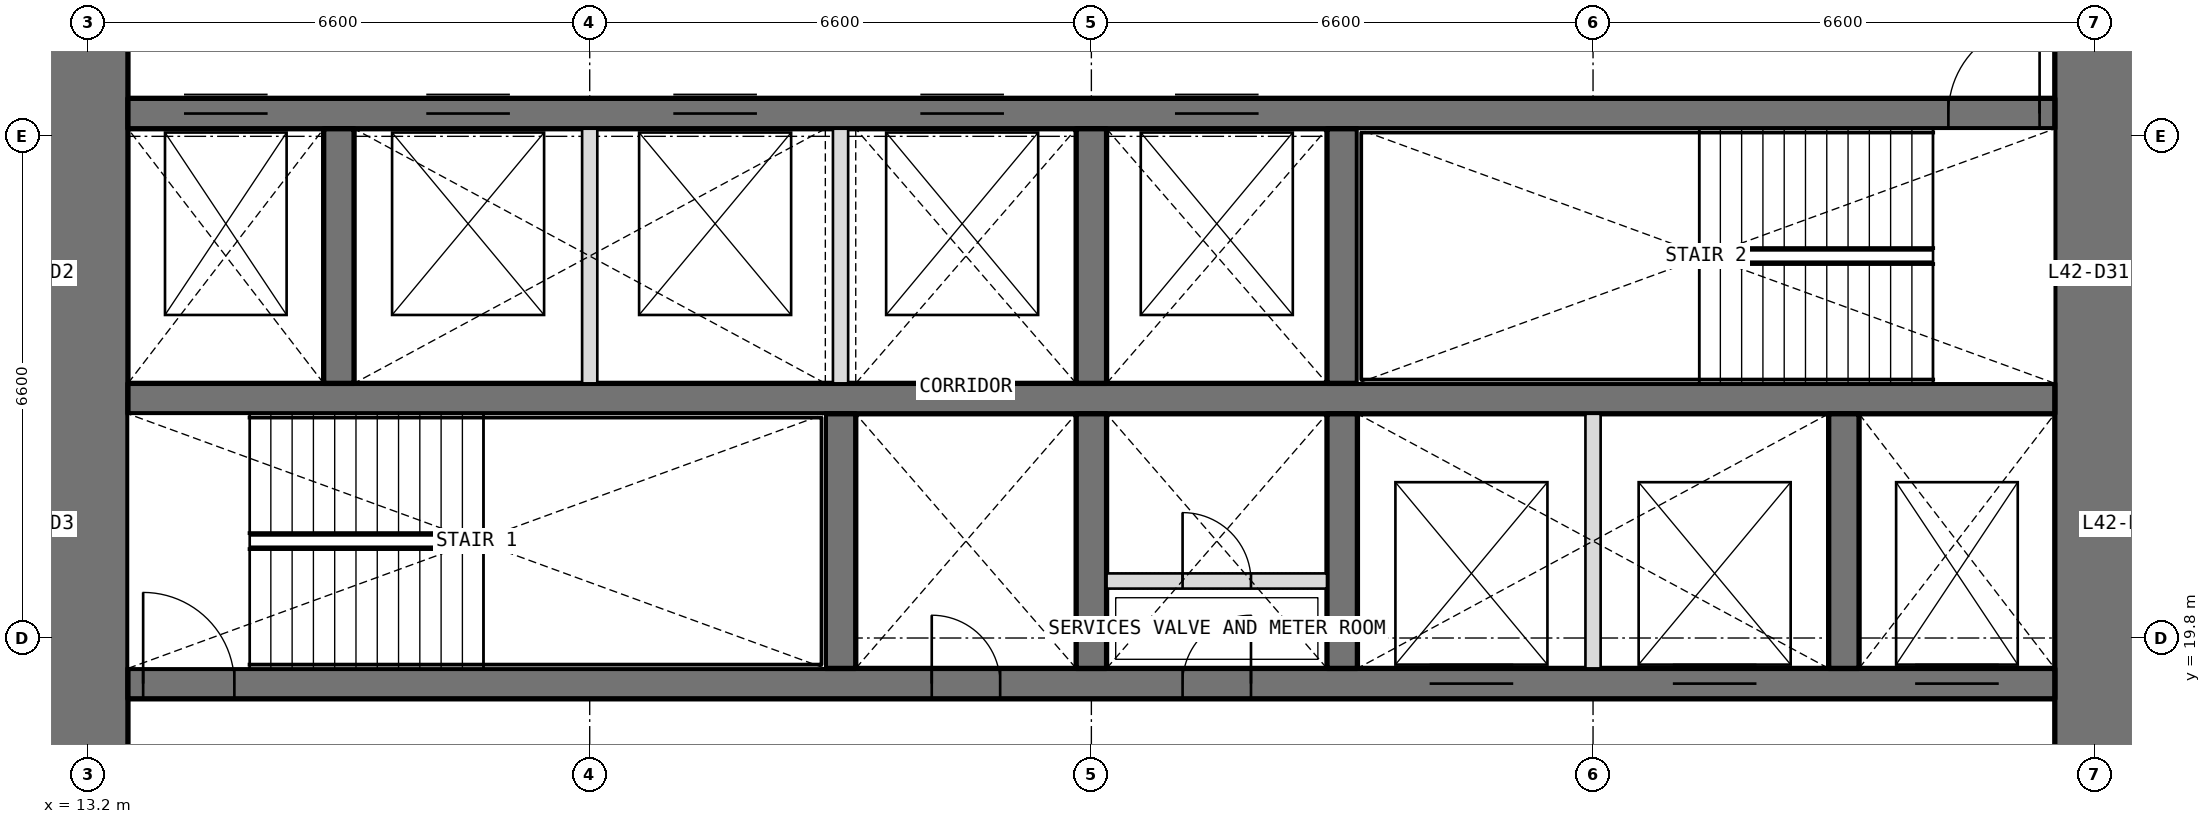
"""IFC4 building model, lengths in metres.
Left out: names, types, materials, properties, quantities, classifications, styles, units other than length and angle.
Written with IfcOpenShell. Run it as: python <this file> out.ifc"""

import sys

from ifc_helpers import new_model, si_unit, direction, frame, frame_2d, origin, place, context, subcontext, project, spatial, rectangle, extrude, element, fill, save


model = new_model("IFC4")
c1 = context("Model", 3, precision=1e-05, world=origin(), true_north=direction((0.0, 1.0)))
c2 = subcontext(c1, "Body", "Model", "MODEL_VIEW")
j1 = project(units=[si_unit("LENGTHUNIT", "METRE"), si_unit("PLANEANGLEUNIT", "RADIAN")], contexts=[c1])
p1 = place(None, origin())
s1 = spatial("IfcSite", under=j1, at=p1, CompositionType="ELEMENT")
p2 = place(p1, origin())
s2 = spatial("IfcBuilding", under=s1, at=p2, CompositionType="ELEMENT")
p3 = place(p2, frame((0.0, 0.0, 185.1)))
s3 = spatial("IfcBuildingStorey", under=s2, at=p3, CompositionType="ELEMENT", Elevation=185.1)
p4 = place(p3, frame((39.6, 13.725, 0.0), z_axis=(0.0, 0.0, 1.0), x_axis=(0.0, 1.0, 0.0)))
e1 = element("IfcWall", 1, at=p4, inside=s3, PredefinedType="SHEAR", context=c2, shape_type="SweptSolid", body=[
    extrude(rectangle(XDim=18.75, YDim=1.05, at=frame_2d((9.375, 0.0))), origin(), (0.0, 0.0, 1.0), 4.2),
])
p5 = place(p4, frame((3.025, 0.0, 0.0)))
e2 = element("IfcOpeningElement", 2, at=p5, cuts=e1, PredefinedType="OPENING", context=c2, shape_type="SweptSolid", body=[
    extrude(rectangle(XDim=1.6, YDim=2.1, at=frame_2d((0.8, 1.05))), frame((0.0, 0.535, 0.0), z_axis=(0.0, -1.0, 0.0), x_axis=(1.0, 0.0, 0.0)), (0.0, 0.0, 1.0), 1.07),
])
p6 = place(p4, frame((13.825, 0.0, 0.0)))
e3 = element("IfcOpeningElement", 3, at=p6, cuts=e1, PredefinedType="OPENING", context=c2, shape_type="SweptSolid", body=[
    extrude(rectangle(XDim=1.6, YDim=2.1, at=frame_2d((0.8, 1.05))), frame((0.0, 0.535, 0.0), z_axis=(0.0, -1.0, 0.0), x_axis=(1.0, 0.0, 0.0)), (0.0, 0.0, 1.0), 1.07),
])
p7 = place(p3, frame((13.2, 32.475, 0.0), z_axis=(0.0, 0.0, 1.0), x_axis=(0.0, -1.0, 0.0)))
e4 = element("IfcWall", 4, at=p7, inside=s3, PredefinedType="SHEAR", context=c2, shape_type="SweptSolid", body=[
    extrude(rectangle(XDim=18.75, YDim=1.05, at=frame_2d((9.375, 0.0))), origin(), (0.0, 0.0, 1.0), 4.2),
])
p8 = place(p7, frame((14.125, 0.0, 0.0)))
e5 = element("IfcOpeningElement", 5, at=p8, cuts=e4, PredefinedType="OPENING", context=c2, shape_type="SweptSolid", body=[
    extrude(rectangle(XDim=1.6, YDim=2.1, at=frame_2d((0.8, 1.05))), frame((0.0, 0.535, 0.0), z_axis=(0.0, -1.0, 0.0), x_axis=(1.0, 0.0, 0.0)), (0.0, 0.0, 1.0), 1.07),
])
p9 = place(p7, frame((3.325, 0.0, 0.0)))
e6 = element("IfcOpeningElement", 6, at=p9, cuts=e4, PredefinedType="OPENING", context=c2, shape_type="SweptSolid", body=[
    extrude(rectangle(XDim=1.6, YDim=2.1, at=frame_2d((0.8, 1.05))), frame((0.0, 0.535, 0.0), z_axis=(0.0, -1.0, 0.0), x_axis=(1.0, 0.0, 0.0)), (0.0, 0.0, 1.0), 1.07),
])
p10 = place(p3, frame((13.725, 19.2, 0.0), z_axis=(0.0, 0.0, 1.0), x_axis=(1.0, 0.0, 0.0)))
e7 = element("IfcWall", 7, at=p10, inside=s3, PredefinedType="SHEAR", context=c2, shape_type="SweptSolid", body=[
    extrude(rectangle(XDim=25.35, YDim=0.4, at=frame_2d((12.675, 0.0))), origin(), (0.0, 0.0, 1.0), 4.2),
])
p11 = place(p10, frame((10.575, 0.0, 0.0)))
e8 = element("IfcOpeningElement", 8, at=p11, cuts=e7, PredefinedType="OPENING", context=c2, shape_type="SweptSolid", body=[
    extrude(rectangle(XDim=0.9, YDim=2.1, at=frame_2d((0.45, 1.05))), frame((0.0, 0.21, 0.0), z_axis=(0.0, -1.0, 0.0), x_axis=(1.0, 0.0, 0.0)), (0.0, 0.0, 1.0), 0.42),
])
p12 = place(p10, frame((13.875, 0.0, 0.0)))
e9 = element("IfcOpeningElement", 9, at=p12, cuts=e7, PredefinedType="OPENING", context=c2, shape_type="SweptSolid", body=[
    extrude(rectangle(XDim=0.9, YDim=2.1, at=frame_2d((0.45, 1.05))), frame((0.0, 0.21, 0.0), z_axis=(0.0, -1.0, 0.0), x_axis=(1.0, 0.0, 0.0)), (0.0, 0.0, 1.0), 0.42),
])
p13 = place(p10, frame((0.2, 0.0, 0.0)))
e10 = element("IfcOpeningElement", 10, at=p13, cuts=e7, PredefinedType="OPENING", context=c2, shape_type="SweptSolid", body=[
    extrude(rectangle(XDim=1.2, YDim=2.1, at=frame_2d((0.6, 1.05))), frame((0.0, 0.21, 0.0), z_axis=(0.0, -1.0, 0.0), x_axis=(1.0, 0.0, 0.0)), (0.0, 0.0, 1.0), 0.42),
])
p14 = place(p10, frame((23.512, 0.0, 0.0)))
e11 = element("IfcOpeningElement", 11, at=p14, cuts=e7, PredefinedType="OPENING", context=c2, shape_type="SweptSolid", body=[
    extrude(rectangle(XDim=1.1, YDim=2.1, at=frame_2d((0.55, 1.05))), frame((0.0, 0.21, 0.0), z_axis=(0.0, -1.0, 0.0), x_axis=(1.0, 0.0, 0.0)), (0.0, 0.0, 1.0), 0.42),
])
p15 = place(p10, frame((17.125, 0.0, 0.0)))
e12 = element("IfcOpeningElement", 12, at=p15, cuts=e7, PredefinedType="OPENING", context=c2, shape_type="SweptSolid", body=[
    extrude(rectangle(XDim=1.1, YDim=2.1, at=frame_2d((0.55, 1.05))), frame((0.0, 0.21, 0.0), z_axis=(0.0, -1.0, 0.0), x_axis=(1.0, 0.0, 0.0)), (0.0, 0.0, 1.0), 0.42),
])
p16 = place(p10, frame((20.325, 0.0, 0.0)))
e13 = element("IfcOpeningElement", 13, at=p16, cuts=e7, PredefinedType="OPENING", context=c2, shape_type="SweptSolid", body=[
    extrude(rectangle(XDim=1.1, YDim=2.1, at=frame_2d((0.55, 1.05))), frame((0.0, 0.21, 0.0), z_axis=(0.0, -1.0, 0.0), x_axis=(1.0, 0.0, 0.0)), (0.0, 0.0, 1.0), 0.42),
])
p17 = place(p3, frame((13.725, 22.95, 0.0), z_axis=(0.0, 0.0, 1.0), x_axis=(1.0, 0.0, 0.0)))
e14 = element("IfcWall", 14, at=p17, inside=s3, PredefinedType="SHEAR", context=c2, shape_type="SweptSolid", body=[
    extrude(rectangle(XDim=25.35, YDim=0.4, at=frame_2d((12.675, 0.0))), origin(), (0.0, 0.0, 1.0), 4.2),
])
p18 = place(p3, frame((13.725, 26.7, 0.0), z_axis=(0.0, 0.0, 1.0), x_axis=(1.0, 0.0, 0.0)))
e15 = element("IfcWall", 15, at=p18, inside=s3, PredefinedType="SHEAR", context=c2, shape_type="SweptSolid", body=[
    extrude(rectangle(XDim=25.35, YDim=0.4, at=frame_2d((12.675, 0.0))), origin(), (0.0, 0.0, 1.0), 4.2),
])
p19 = place(p18, frame((23.95, 0.0, 0.0)))
e16 = element("IfcOpeningElement", 16, at=p19, cuts=e15, PredefinedType="OPENING", context=c2, shape_type="SweptSolid", body=[
    extrude(rectangle(XDim=1.2, YDim=2.1, at=frame_2d((0.6, 1.05))), frame((0.0, 0.21, 0.0), z_axis=(0.0, -1.0, 0.0), x_axis=(1.0, 0.0, 0.0)), (0.0, 0.0, 1.0), 0.42),
])
p20 = place(p18, frame((0.738, 0.0, 0.0)))
e17 = element("IfcOpeningElement", 17, at=p20, cuts=e15, PredefinedType="OPENING", context=c2, shape_type="SweptSolid", body=[
    extrude(rectangle(XDim=1.1, YDim=2.1, at=frame_2d((0.55, 1.05))), frame((0.0, 0.21, 0.0), z_axis=(0.0, -1.0, 0.0), x_axis=(1.0, 0.0, 0.0)), (0.0, 0.0, 1.0), 0.42),
])
p21 = place(p18, frame((3.925, 0.0, 0.0)))
e18 = element("IfcOpeningElement", 18, at=p21, cuts=e15, PredefinedType="OPENING", context=c2, shape_type="SweptSolid", body=[
    extrude(rectangle(XDim=1.1, YDim=2.1, at=frame_2d((0.55, 1.05))), frame((0.0, 0.21, 0.0), z_axis=(0.0, -1.0, 0.0), x_axis=(1.0, 0.0, 0.0)), (0.0, 0.0, 1.0), 0.42),
])
p22 = place(p18, frame((7.175, 0.0, 0.0)))
e19 = element("IfcOpeningElement", 19, at=p22, cuts=e15, PredefinedType="OPENING", context=c2, shape_type="SweptSolid", body=[
    extrude(rectangle(XDim=1.1, YDim=2.1, at=frame_2d((0.55, 1.05))), frame((0.0, 0.21, 0.0), z_axis=(0.0, -1.0, 0.0), x_axis=(1.0, 0.0, 0.0)), (0.0, 0.0, 1.0), 0.42),
])
p23 = place(p18, frame((10.425, 0.0, 0.0)))
e20 = element("IfcOpeningElement", 20, at=p23, cuts=e15, PredefinedType="OPENING", context=c2, shape_type="SweptSolid", body=[
    extrude(rectangle(XDim=1.1, YDim=2.1, at=frame_2d((0.55, 1.05))), frame((0.0, 0.21, 0.0), z_axis=(0.0, -1.0, 0.0), x_axis=(1.0, 0.0, 0.0)), (0.0, 0.0, 1.0), 0.42),
])
p24 = place(p18, frame((13.775, 0.0, 0.0)))
e21 = element("IfcOpeningElement", 21, at=p24, cuts=e15, PredefinedType="OPENING", context=c2, shape_type="SweptSolid", body=[
    extrude(rectangle(XDim=1.1, YDim=2.1, at=frame_2d((0.55, 1.05))), frame((0.0, 0.21, 0.0), z_axis=(0.0, -1.0, 0.0), x_axis=(1.0, 0.0, 0.0)), (0.0, 0.0, 1.0), 0.42),
])
for number, where, z_axis, x_axis in (
    (22, (23.1, 19.4, 0.0), (0.0, 0.0, 1.0), (0.0, 1.0, 0.0)),
    (23, (26.4, 19.4, 0.0), (0.0, 0.0, 1.0), (0.0, 1.0, 0.0)),
    (24, (29.7, 19.4, 0.0), (0.0, 0.0, 1.0), (0.0, 1.0, 0.0)),
    (25, (36.3, 19.4, 0.0), (0.0, 0.0, 1.0), (0.0, 1.0, 0.0)),
    (26, (16.5, 23.15, 0.0), (0.0, 0.0, 1.0), (0.0, 1.0, 0.0)),
    (27, (26.4, 23.15, 0.0), (0.0, 0.0, 1.0), (0.0, 1.0, 0.0)),
    (28, (29.7, 23.15, 0.0), (0.0, 0.0, 1.0), (0.0, 1.0, 0.0)),
):
    element("IfcWall", number, at=place(p3, frame(where, z_axis=z_axis, x_axis=x_axis)), inside=s3, PredefinedType="SHEAR", context=c2, shape_type="SweptSolid", body=[
        extrude(rectangle(XDim=3.35, YDim=0.4, at=frame_2d((1.675, 0.0))), origin(), (0.0, 0.0, 1.0), 4.2),
    ])
for number, where, z_axis, x_axis in (
    (29, (33.0, 19.4, 0.0), (0.0, 0.0, 1.0), (0.0, 1.0, 0.0)),
    (30, (19.8, 23.15, 0.0), (0.0, 0.0, 1.0), (0.0, 1.0, 0.0)),
    (31, (23.1, 23.15, 0.0), (0.0, 0.0, 1.0), (0.0, 1.0, 0.0)),
):
    element("IfcWall", number, at=place(p3, frame(where, z_axis=z_axis, x_axis=x_axis)), inside=s3, PredefinedType="PARTITIONING", context=c2, shape_type="SweptSolid", body=[
        extrude(rectangle(XDim=3.35, YDim=0.2, at=frame_2d((1.675, 0.0))), origin(), (0.0, 0.0, 1.0), 4.2),
    ])
p25 = place(p3, frame((26.6, 20.55, 0.0), z_axis=(0.0, 0.0, 1.0), x_axis=(1.0, 0.0, 0.0)))
e32 = element("IfcWall", 32, at=p25, inside=s3, PredefinedType="PARTITIONING", context=c2, shape_type="SweptSolid", body=[
    extrude(rectangle(XDim=2.9, YDim=0.2, at=frame_2d((1.45, 0.0))), origin(), (0.0, 0.0, 1.0), 3.9),
])
p26 = place(p25, frame((1.0, 0.0, 0.0)))
e33 = element("IfcOpeningElement", 33, at=p26, cuts=e32, PredefinedType="OPENING", context=c2, shape_type="SweptSolid", body=[
    extrude(rectangle(XDim=0.9, YDim=2.1, at=frame_2d((0.45, 1.05))), frame((0.0, 0.11, 0.0), z_axis=(0.0, -1.0, 0.0), x_axis=(1.0, 0.0, 0.0)), (0.0, 0.0, 1.0), 0.22),
])
p27 = place(p11, origin())
e34 = element("IfcDoor", 34, at=p27, inside=s3, OperationType="SINGLE_SWING_LEFT", PredefinedType="DOOR", context=c2, shape_type="SweptSolid", body=[
    extrude(rectangle(XDim=0.9, YDim=2.1, at=frame_2d((0.45, 1.05))), frame((0.0, 0.025, 0.0), z_axis=(0.0, -1.0, 0.0), x_axis=(1.0, 0.0, 0.0)), (0.0, 0.0, 1.0), 0.05),
])
fill(e8, e34)
p28 = place(p12, origin())
e35 = element("IfcDoor", 35, at=p28, inside=s3, OperationType="SINGLE_SWING_RIGHT", PredefinedType="DOOR", context=c2, shape_type="SweptSolid", body=[
    extrude(rectangle(XDim=0.9, YDim=2.1, at=frame_2d((0.45, 1.05))), frame((0.0, 0.025, 0.0), z_axis=(0.0, -1.0, 0.0), x_axis=(1.0, 0.0, 0.0)), (0.0, 0.0, 1.0), 0.05),
])
fill(e9, e35)
p29 = place(p26, origin())
e36 = element("IfcDoor", 36, at=p29, inside=s3, OperationType="SINGLE_SWING_LEFT", PredefinedType="DOOR", context=c2, shape_type="SweptSolid", body=[
    extrude(rectangle(XDim=0.9, YDim=2.1, at=frame_2d((0.45, 1.05))), frame((0.0, 0.025, 0.0), z_axis=(0.0, -1.0, 0.0), x_axis=(1.0, 0.0, 0.0)), (0.0, 0.0, 1.0), 0.05),
])
fill(e33, e36)
p30 = place(p13, origin())
e37 = element("IfcDoor", 37, at=p30, inside=s3, OperationType="SINGLE_SWING_LEFT", PredefinedType="DOOR", context=c2, shape_type="SweptSolid", body=[
    extrude(rectangle(XDim=1.2, YDim=2.1, at=frame_2d((0.6, 1.05))), frame((0.0, 0.025, 0.0), z_axis=(0.0, -1.0, 0.0), x_axis=(1.0, 0.0, 0.0)), (0.0, 0.0, 1.0), 0.05),
])
fill(e10, e37)
p31 = place(p19, origin())
e38 = element("IfcDoor", 38, at=p31, inside=s3, OperationType="SINGLE_SWING_RIGHT", PredefinedType="DOOR", context=c2, shape_type="SweptSolid", body=[
    extrude(rectangle(XDim=1.2, YDim=2.1, at=frame_2d((0.6, 1.05))), frame((0.0, 0.025, 0.0), z_axis=(0.0, -1.0, 0.0), x_axis=(1.0, 0.0, 0.0)), (0.0, 0.0, 1.0), 0.05),
])
fill(e16, e38)
p32 = place(p20, origin())
e39 = element("IfcDoor", 39, at=p32, inside=s3, OperationType="DOUBLE_DOOR_SLIDING", PredefinedType="DOOR", context=c2, shape_type="SweptSolid", body=[
    extrude(rectangle(XDim=1.1, YDim=2.1, at=frame_2d((0.55, 1.05))), frame((0.0, 0.025, 0.0), z_axis=(0.0, -1.0, 0.0), x_axis=(1.0, 0.0, 0.0)), (0.0, 0.0, 1.0), 0.05),
])
fill(e17, e39)
p33 = place(p14, origin())
e40 = element("IfcDoor", 40, at=p33, inside=s3, OperationType="DOUBLE_DOOR_SLIDING", PredefinedType="DOOR", context=c2, shape_type="SweptSolid", body=[
    extrude(rectangle(XDim=1.1, YDim=2.1, at=frame_2d((0.55, 1.05))), frame((0.0, 0.025, 0.0), z_axis=(0.0, -1.0, 0.0), x_axis=(1.0, 0.0, 0.0)), (0.0, 0.0, 1.0), 0.05),
])
fill(e11, e40)
p34 = place(p15, origin())
e41 = element("IfcDoor", 41, at=p34, inside=s3, OperationType="DOUBLE_DOOR_SLIDING", PredefinedType="DOOR", context=c2, shape_type="SweptSolid", body=[
    extrude(rectangle(XDim=1.1, YDim=2.1, at=frame_2d((0.55, 1.05))), frame((0.0, 0.025, 0.0), z_axis=(0.0, -1.0, 0.0), x_axis=(1.0, 0.0, 0.0)), (0.0, 0.0, 1.0), 0.05),
])
fill(e12, e41)
p35 = place(p16, origin())
e42 = element("IfcDoor", 42, at=p35, inside=s3, OperationType="DOUBLE_DOOR_SLIDING", PredefinedType="DOOR", context=c2, shape_type="SweptSolid", body=[
    extrude(rectangle(XDim=1.1, YDim=2.1, at=frame_2d((0.55, 1.05))), frame((0.0, 0.025, 0.0), z_axis=(0.0, -1.0, 0.0), x_axis=(1.0, 0.0, 0.0)), (0.0, 0.0, 1.0), 0.05),
])
fill(e13, e42)
p36 = place(p21, origin())
e43 = element("IfcDoor", 43, at=p36, inside=s3, OperationType="DOUBLE_DOOR_SLIDING", PredefinedType="DOOR", context=c2, shape_type="SweptSolid", body=[
    extrude(rectangle(XDim=1.1, YDim=2.1, at=frame_2d((0.55, 1.05))), frame((0.0, 0.025, 0.0), z_axis=(0.0, -1.0, 0.0), x_axis=(1.0, 0.0, 0.0)), (0.0, 0.0, 1.0), 0.05),
])
fill(e18, e43)
p37 = place(p22, origin())
e44 = element("IfcDoor", 44, at=p37, inside=s3, OperationType="DOUBLE_DOOR_SLIDING", PredefinedType="DOOR", context=c2, shape_type="SweptSolid", body=[
    extrude(rectangle(XDim=1.1, YDim=2.1, at=frame_2d((0.55, 1.05))), frame((0.0, 0.025, 0.0), z_axis=(0.0, -1.0, 0.0), x_axis=(1.0, 0.0, 0.0)), (0.0, 0.0, 1.0), 0.05),
])
fill(e19, e44)
p38 = place(p23, origin())
e45 = element("IfcDoor", 45, at=p38, inside=s3, OperationType="DOUBLE_DOOR_SLIDING", PredefinedType="DOOR", context=c2, shape_type="SweptSolid", body=[
    extrude(rectangle(XDim=1.1, YDim=2.1, at=frame_2d((0.55, 1.05))), frame((0.0, 0.025, 0.0), z_axis=(0.0, -1.0, 0.0), x_axis=(1.0, 0.0, 0.0)), (0.0, 0.0, 1.0), 0.05),
])
fill(e20, e45)
p39 = place(p24, origin())
e46 = element("IfcDoor", 46, at=p39, inside=s3, OperationType="DOUBLE_DOOR_SLIDING", PredefinedType="DOOR", context=c2, shape_type="SweptSolid", body=[
    extrude(rectangle(XDim=1.1, YDim=2.1, at=frame_2d((0.55, 1.05))), frame((0.0, 0.025, 0.0), z_axis=(0.0, -1.0, 0.0), x_axis=(1.0, 0.0, 0.0)), (0.0, 0.0, 1.0), 0.05),
])
fill(e21, e46)
save(model, sys.argv[1])
